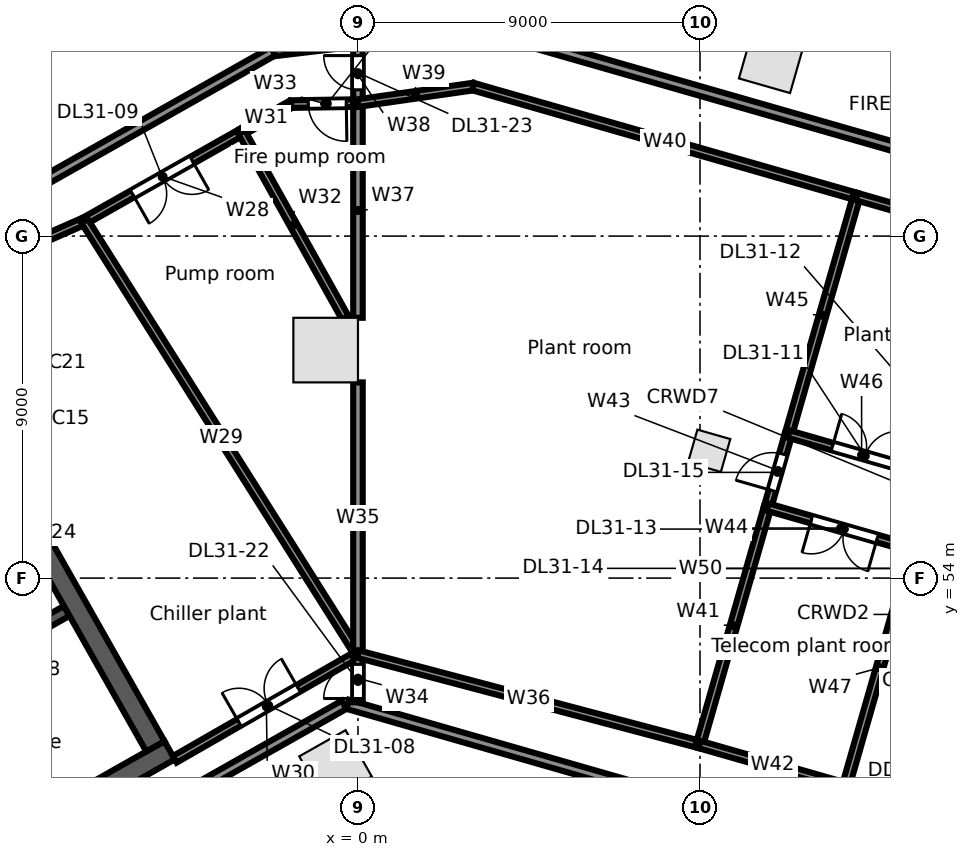
"""IFC4 building model, lengths in metres.
Left out: names, types, materials, properties, quantities, classifications, styles, units other than length and angle.
Written with IfcOpenShell. Run it as: python <this file> out.ifc"""

import sys

from ifc_helpers import new_model, si_unit, direction, frame, frame_2d, origin, origin_2d, place, context, subcontext, project, spatial, rectangle, extrude, element, fill, save


model = new_model("IFC4")
c1 = context("Model", 3, precision=1e-05, world=origin(), true_north=direction((0.0, 1.0)))
c2 = subcontext(c1, "Body", "Model", "MODEL_VIEW")
j1 = project(units=[si_unit("LENGTHUNIT", "METRE"), si_unit("PLANEANGLEUNIT", "RADIAN")], contexts=[c1])
p1 = place(None, origin())
s1 = spatial("IfcSite", under=j1, at=p1, CompositionType="ELEMENT")
p2 = place(p1, origin())
s2 = spatial("IfcBuilding", under=s1, at=p2, CompositionType="ELEMENT")
p3 = place(p2, frame((0.0, 0.0, 149.9)))
s3 = spatial("IfcBuildingStorey", under=s2, at=p3, CompositionType="ELEMENT", Elevation=149.9)
for number, where, z_axis, x_axis in (
    (1, (10.89, 67.629, 0.0), (0.0, 0.0, 1.0), (-0.961, 0.276, 0.0)),
    (2, (-0.591, 49.044, 0.0), (0.0, 0.0, 1.0), (0.87, 0.492, 0.0)),
):
    element("IfcColumn", number, at=place(p3, frame(where, z_axis=z_axis, x_axis=x_axis)), inside=s3, PredefinedType="COLUMN", context=c2, shape_type="SweptSolid", body=[
        extrude(rectangle(XDim=1.4, YDim=1.4, at=origin_2d()), origin(), (0.0, 0.0, 1.0), 5.0),
    ])
p4 = place(p3, frame((-0.85, 60.0, 0.0), z_axis=(0.0, 0.0, 1.0), x_axis=(0.0, 1.0, 0.0)))
e3 = element("IfcColumn", 3, at=p4, inside=s3, PredefinedType="COLUMN", context=c2, shape_type="SweptSolid", body=[
    extrude(rectangle(XDim=1.7, YDim=1.7, at=origin_2d()), origin(), (0.0, 0.0, 1.0), 5.0),
])
p5 = place(p3, frame((9.241, 57.35, 0.0), z_axis=(0.0, 0.0, 1.0), x_axis=(0.961261695938, -0.275637355817, 0.0)))
e4 = element("IfcColumn", 4, at=p5, inside=s3, PredefinedType="COLUMN", context=c2, shape_type="SweptSolid", body=[
    extrude(rectangle(XDim=0.9, YDim=0.9, at=origin_2d()), origin(), (0.0, 0.0, 1.0), 5.0),
])
p6 = place(p3, frame((3.135, 68.5, 0.0), z_axis=(0.0, 0.0, 1.0), x_axis=(0.961261620067, -0.275637620413, 0.0)))
e5 = element("IfcWall", 5, at=p6, inside=s3, PredefinedType="STANDARD", context=c2, shape_type="SweptSolid", body=[
    extrude(rectangle(XDim=31.907, YDim=0.25, at=frame_2d((15.953, 0.0))), origin(), (0.0, 0.0, 1.0), 3.768),
])
p7 = place(p3, frame((-2.278, 67.85, 0.0), z_axis=(0.0, 0.0, 1.0), x_axis=(0.993072509993, 0.117503148449, 0.0)))
e6 = element("IfcWall", 6, at=p7, inside=s3, PredefinedType="STANDARD", context=c2, shape_type="SweptSolid", body=[
    extrude(rectangle(XDim=5.5, YDim=0.25, at=frame_2d((2.75, 0.0))), origin(), (0.0, 0.0, 1.0), 3.768),
])
p8 = place(p3, frame((-56.251, 37.302, 0.0), z_axis=(0.0, 0.0, 1.0), x_axis=(0.87035543516, 0.49242402103, 0.0)))
e7 = element("IfcWall", 7, at=p8, inside=s3, PredefinedType="STANDARD", context=c2, shape_type="SweptSolid", body=[
    extrude(rectangle(XDim=62.067, YDim=0.25, at=frame_2d((31.033, 0.0))), origin(), (0.0, 0.0, 1.0), 3.872),
])
p9 = place(p3, frame((-0.364, 50.666, 0.0), z_axis=(0.0, 0.0, 1.0), x_axis=(-0.870355021882, -0.492424751494, 0.0)))
e8 = element("IfcWall", 8, at=p9, inside=s3, PredefinedType="STANDARD", context=c2, shape_type="SweptSolid", body=[
    extrude(rectangle(XDim=44.126, YDim=0.25, at=frame_2d((22.063, 0.0))), origin(), (0.0, 0.0, 1.0), 3.768),
])
p10 = place(p3, frame((26.726, 42.937, 0.0), z_axis=(0.0, 0.0, 1.0), x_axis=(-0.96126039977, 0.275641876052, 0.0)))
e9 = element("IfcWall", 9, at=p10, inside=s3, PredefinedType="STANDARD", context=c2, shape_type="SweptSolid", body=[
    extrude(rectangle(XDim=28.083, YDim=0.25, at=frame_2d((14.041, 0.0))), origin(), (0.0, 0.0, 1.0), 3.768),
])
p11 = place(p3, frame((-18.012, 42.083, 0.0), z_axis=(0.0, 0.0, 1.0), x_axis=(0.870360574057, 0.492414937962, 0.0)))
e10 = element("IfcWall", 10, at=p11, inside=s3, PredefinedType="SOLIDWALL", context=c2, shape_type="SweptSolid", body=[
    extrude(rectangle(XDim=15.0, YDim=0.55, at=frame_2d((7.5, 0.0))), origin(), (0.0, 0.0, 1.0), 4.68),
])
p12 = place(p11, frame((6.1, 0.0, 0.0)))
e11 = element("IfcOpeningElement", 11, at=p12, cuts=e10, PredefinedType="OPENING", context=c2, shape_type="SweptSolid", body=[
    extrude(rectangle(XDim=1.2, YDim=2.1, at=frame_2d((0.6, 1.05))), frame((0.0, 0.285, 0.0), z_axis=(0.0, -1.0, 0.0), x_axis=(1.0, 0.0, 0.0)), (0.0, 0.0, 1.0), 0.57),
])
p13 = place(p3, frame((-13.365, 49.911, 0.0), z_axis=(0.0, 0.0, 1.0), x_axis=(0.870336435567, 0.492457601144, 0.0)))
e12 = element("IfcWall", 12, at=p13, inside=s3, PredefinedType="SOLIDWALL", context=c2, shape_type="SweptSolid", body=[
    extrude(rectangle(XDim=6.55, YDim=0.3, at=frame_2d((3.275, 0.0))), origin(), (0.0, 0.0, 1.0), 4.68),
])
p14 = place(p13, frame((2.95, 0.0, 0.0)))
e13 = element("IfcOpeningElement", 13, at=p14, cuts=e12, PredefinedType="OPENING", context=c2, shape_type="SweptSolid", body=[
    extrude(rectangle(XDim=0.9, YDim=2.1, at=frame_2d((0.45, 1.05))), frame((0.0, 0.16, 0.0), z_axis=(0.0, -1.0, 0.0), x_axis=(1.0, 0.0, 0.0)), (0.0, 0.0, 1.0), 0.32),
])
p15 = place(p3, frame((-11.684, 60.8, 0.0), z_axis=(0.0, 0.0, 1.0), x_axis=(0.492427022044, -0.870353737259, 0.0)))
e14 = element("IfcWall", 14, at=p15, inside=s3, PredefinedType="SOLIDWALL", context=c2, shape_type="SweptSolid", body=[
    extrude(rectangle(XDim=12.9, YDim=0.55, at=frame_2d((6.45, 0.0))), origin(), (0.0, 0.0, 1.0), 4.68),
])
p16 = place(p3, frame((-11.715, 61.414, 0.0), z_axis=(0.0, 0.0, 1.0), x_axis=(0.915723068672, 0.401809981834, 0.0)))
e15 = element("IfcWall", 15, at=p16, inside=s3, PredefinedType="PARTITIONING", context=c2, shape_type="SweptSolid", body=[
    extrude(rectangle(XDim=4.935, YDim=0.2, at=frame_2d((2.468, 0.0))), origin(), (0.0, 0.0, 1.0), 3.852),
])
p17 = place(p3, frame((-7.196, 63.397, 0.0), z_axis=(0.0, 0.0, 1.0), x_axis=(0.870338743261, 0.492453522659, 0.0)))
e16 = element("IfcWall", 16, at=p17, inside=s3, PredefinedType="PARTITIONING", context=c2, shape_type="SweptSolid", body=[
    extrude(rectangle(XDim=4.75, YDim=0.2, at=frame_2d((2.375, 0.0))), origin(), (0.0, 0.0, 1.0), 4.68),
])
p18 = place(p17, frame((1.45, 0.0, 0.0)))
e17 = element("IfcOpeningElement", 17, at=p18, cuts=e16, PredefinedType="OPENING", context=c2, shape_type="SweptSolid", body=[
    extrude(rectangle(XDim=1.8, YDim=2.1, at=frame_2d((0.9, 1.05))), frame((0.0, 0.11, 0.0), z_axis=(0.0, -1.0, 0.0), x_axis=(1.0, 0.0, 0.0)), (0.0, 0.0, 1.0), 0.22),
])
p19 = place(p3, frame((-7.196, 63.397, 0.0), z_axis=(0.0, 0.0, 1.0), x_axis=(0.533884631006, -0.845557331454, 0.0)))
e18 = element("IfcWall", 18, at=p19, inside=s3, PredefinedType="PARTITIONING", context=c2, shape_type="SweptSolid", body=[
    extrude(rectangle(XDim=13.479, YDim=0.2, at=frame_2d((6.739, 0.0))), origin(), (0.0, 0.0, 1.0), 3.748),
])
p20 = place(p3, frame((-4.821, 49.23, 0.0), z_axis=(0.0, 0.0, 1.0), x_axis=(0.867068012741, 0.498189784401, 0.0)))
e19 = element("IfcWall", 19, at=p20, inside=s3, PredefinedType="PARTITIONING", context=c2, shape_type="SweptSolid", body=[
    extrude(rectangle(XDim=5.56, YDim=0.2, at=frame_2d((2.78, 0.0))), origin(), (0.0, 0.0, 1.0), 3.748),
])
p21 = place(p20, frame((1.95, 0.0, 0.0)))
e20 = element("IfcOpeningElement", 20, at=p21, cuts=e19, PredefinedType="OPENING", context=c2, shape_type="SweptSolid", body=[
    extrude(rectangle(XDim=1.8, YDim=2.1, at=frame_2d((0.9, 1.05))), frame((0.0, 0.11, 0.0), z_axis=(0.0, -1.0, 0.0), x_axis=(1.0, 0.0, 0.0)), (0.0, 0.0, 1.0), 0.22),
])
p22 = place(p3, frame((-3.062, 65.736, 0.0), z_axis=(0.0, 0.0, 1.0), x_axis=(0.870429354291, 0.492293346683, 0.0)))
e21 = element("IfcWall", 21, at=p22, inside=s3, PredefinedType="PARTITIONING", context=c2, shape_type="SweptSolid", body=[
    extrude(rectangle(XDim=1.499, YDim=0.2, at=frame_2d((0.75, 0.0))), origin(), (0.0, 0.0, 1.0), 4.68),
])
p23 = place(p3, frame((-3.062, 65.736, 0.0), z_axis=(0.0, 0.0, 1.0), x_axis=(0.487364611917, -0.873198565649, 0.0)))
e22 = element("IfcWall", 22, at=p23, inside=s3, PredefinedType="PARTITIONING", context=c2, shape_type="SweptSolid", body=[
    extrude(rectangle(XDim=5.595, YDim=0.2, at=frame_2d((2.798, 0.0))), origin(), (0.0, 0.0, 1.0), 3.96),
])
p24 = place(p3, frame((-1.757, 66.474, 0.0), z_axis=(0.0, 0.0, 1.0), x_axis=(0.999891555363, 0.014726761827, 0.0)))
e23 = element("IfcWall", 23, at=p24, inside=s3, PredefinedType="PARTITIONING", context=c2, shape_type="SweptSolid", body=[
    extrude(rectangle(XDim=1.757, YDim=0.2, at=frame_2d((0.879, 0.0))), origin(), (0.0, 0.0, 1.0), 3.96),
])
p25 = place(p24, frame((0.45, 0.0, 0.0)))
e24 = element("IfcOpeningElement", 24, at=p25, cuts=e23, PredefinedType="OPENING", context=c2, shape_type="SweptSolid", body=[
    extrude(rectangle(XDim=1.0, YDim=2.1, at=frame_2d((0.5, 1.05))), frame((0.0, 0.11, 0.0), z_axis=(0.0, -1.0, 0.0), x_axis=(1.0, 0.0, 0.0)), (0.0, 0.0, 1.0), 0.22),
])
p26 = place(p3, frame((0.0, 50.731, 0.0), z_axis=(0.0, 0.0, 1.0), x_axis=(0.0, 1.0, 0.0)))
e25 = element("IfcWall", 25, at=p26, inside=s3, PredefinedType="PARTITIONING", context=c2, shape_type="SweptSolid", body=[
    extrude(rectangle(XDim=1.269, YDim=0.25, at=frame_2d((0.635, 0.0))), origin(), (0.0, 0.0, 1.0), 4.68),
])
p27 = place(p26, frame((0.1, 0.0, 0.0)))
e26 = element("IfcOpeningElement", 26, at=p27, cuts=e25, PredefinedType="OPENING", context=c2, shape_type="SweptSolid", body=[
    extrude(rectangle(XDim=0.9, YDim=2.1, at=frame_2d((0.45, 1.05))), frame((0.0, 0.135, 0.0), z_axis=(0.0, -1.0, 0.0), x_axis=(1.0, 0.0, 0.0)), (0.0, 0.0, 1.0), 0.27),
])
p28 = place(p3, frame((0.0, 52.0, 0.0), z_axis=(0.0, 0.0, 1.0), x_axis=(0.0, 1.0, 0.0)))
e27 = element("IfcWall", 27, at=p28, inside=s3, PredefinedType="PARTITIONING", context=c2, shape_type="SweptSolid", body=[
    extrude(rectangle(XDim=7.15, YDim=0.25, at=frame_2d((3.575, 0.0))), origin(), (0.0, 0.0, 1.0), 4.68),
])
p29 = place(p3, frame((0.0, 52.0, 0.0), z_axis=(0.0, 0.0, 1.0), x_axis=(0.966705801065, -0.255890394871, 0.0)))
e28 = element("IfcWall", 28, at=p29, inside=s3, PredefinedType="PARTITIONING", context=c2, shape_type="SweptSolid", body=[
    extrude(rectangle(XDim=9.297, YDim=0.2, at=frame_2d((4.648, 0.0))), origin(), (0.0, 0.0, 1.0), 3.86),
])
p30 = place(p3, frame((0.0, 60.85, 0.0), z_axis=(0.0, 0.0, 1.0), x_axis=(0.0, 1.0, 0.0)))
e29 = element("IfcWall", 29, at=p30, inside=s3, PredefinedType="PARTITIONING", context=c2, shape_type="SweptSolid", body=[
    extrude(rectangle(XDim=5.65, YDim=0.25, at=frame_2d((2.825, 0.0))), origin(), (0.0, 0.0, 1.0), 3.96),
])
p31 = place(p3, frame((0.0, 66.5, 0.0), z_axis=(0.0, 0.0, 1.0), x_axis=(0.0, 1.0, 0.0)))
e30 = element("IfcWall", 30, at=p31, inside=s3, PredefinedType="PARTITIONING", context=c2, shape_type="SweptSolid", body=[
    extrude(rectangle(XDim=1.494, YDim=0.25, at=frame_2d((0.747, 0.0))), origin(), (0.0, 0.0, 1.0), 3.96),
])
p32 = place(p31, frame((0.35, 0.0, 0.0)))
e31 = element("IfcOpeningElement", 31, at=p32, cuts=e30, PredefinedType="OPENING", context=c2, shape_type="SweptSolid", body=[
    extrude(rectangle(XDim=0.9, YDim=2.1, at=frame_2d((0.45, 1.05))), frame((0.0, 0.135, 0.0), z_axis=(0.0, -1.0, 0.0), x_axis=(1.0, 0.0, 0.0)), (0.0, 0.0, 1.0), 0.27),
])
p33 = place(p3, frame((0.0, 66.5, 0.0), z_axis=(0.0, 0.0, 1.0), x_axis=(0.989887165849, 0.1418569663, 0.0)))
e32 = element("IfcWall", 32, at=p33, inside=s3, PredefinedType="PARTITIONING", context=c2, shape_type="SweptSolid", body=[
    extrude(rectangle(XDim=3.06, YDim=0.2, at=frame_2d((1.53, 0.0))), origin(), (0.0, 0.0, 1.0), 3.748),
])
p34 = place(p3, frame((3.029, 66.934, 0.0), z_axis=(0.0, 0.0, 1.0), x_axis=(0.961263796718, -0.275630029421, 0.0)))
e33 = element("IfcWall", 33, at=p34, inside=s3, PredefinedType="PARTITIONING", context=c2, shape_type="SweptSolid", body=[
    extrude(rectangle(XDim=10.5, YDim=0.2, at=frame_2d((5.25, 0.0))), origin(), (0.0, 0.0, 1.0), 3.748),
])
p35 = place(p3, frame((8.987, 49.621, 0.0), z_axis=(0.0, 0.0, 1.0), x_axis=(0.275703259795, 0.961242795832, 0.0)))
e34 = element("IfcWall", 34, at=p35, inside=s3, PredefinedType="PARTITIONING", context=c2, shape_type="SweptSolid", body=[
    extrude(rectangle(XDim=6.5, YDim=0.2, at=frame_2d((3.25, 0.0))), origin(), (0.0, 0.0, 1.0), 3.86),
])
p36 = place(p3, frame((8.987, 49.621, 0.0), z_axis=(0.0, 0.0, 1.0), x_axis=(0.961228587008, -0.275752794216, 0.0)))
e35 = element("IfcWall", 35, at=p36, inside=s3, PredefinedType="PARTITIONING", context=c2, shape_type="SweptSolid", body=[
    extrude(rectangle(XDim=4.0, YDim=0.2, at=frame_2d((2.0, 0.0))), origin(), (0.0, 0.0, 1.0), 3.748),
])
p37 = place(p3, frame((10.779, 55.869, 0.0), z_axis=(0.0, 0.0, 1.0), x_axis=(0.275575706981, 0.961279371318, 0.0)))
e36 = element("IfcWall", 36, at=p37, inside=s3, PredefinedType="PARTITIONING", context=c2, shape_type="SweptSolid", body=[
    extrude(rectangle(XDim=2.0, YDim=0.2, at=frame_2d((1.0, 0.0))), origin(), (0.0, 0.0, 1.0), 3.748),
])
p38 = place(p37, frame((0.45, 0.0, 0.0)))
e37 = element("IfcOpeningElement", 37, at=p38, cuts=e36, PredefinedType="OPENING", context=c2, shape_type="SweptSolid", body=[
    extrude(rectangle(XDim=1.0, YDim=2.1, at=frame_2d((0.5, 1.05))), frame((0.0, 0.11, 0.0), z_axis=(0.0, -1.0, 0.0), x_axis=(1.0, 0.0, 0.0)), (0.0, 0.0, 1.0), 0.22),
])
p39 = place(p3, frame((10.779, 55.869, 0.0), z_axis=(0.0, 0.0, 1.0), x_axis=(0.961244763457, -0.275696399552, 0.0)))
e38 = element("IfcWall", 38, at=p39, inside=s3, PredefinedType="PARTITIONING", context=c2, shape_type="SweptSolid", body=[
    extrude(rectangle(XDim=4.0, YDim=0.2, at=frame_2d((2.0, 0.0))), origin(), (0.0, 0.0, 1.0), 3.748),
])
p40 = place(p39, frame((1.2, 0.0, 0.0)))
e39 = element("IfcOpeningElement", 39, at=p40, cuts=e38, PredefinedType="OPENING", context=c2, shape_type="SweptSolid", body=[
    extrude(rectangle(XDim=1.8, YDim=2.1, at=frame_2d((0.9, 1.05))), frame((0.0, 0.11, 0.0), z_axis=(0.0, -1.0, 0.0), x_axis=(1.0, 0.0, 0.0)), (0.0, 0.0, 1.0), 0.22),
])
p41 = place(p3, frame((11.33, 57.791, 0.0), z_axis=(0.0, 0.0, 1.0), x_axis=(0.27565349575, 0.96125706774, 0.0)))
e40 = element("IfcWall", 40, at=p41, inside=s3, PredefinedType="PARTITIONING", context=c2, shape_type="SweptSolid", body=[
    extrude(rectangle(XDim=6.501, YDim=0.2, at=frame_2d((3.25, 0.0))), origin(), (0.0, 0.0, 1.0), 3.748),
])
p42 = place(p3, frame((11.33, 57.791, 0.0), z_axis=(0.0, 0.0, 1.0), x_axis=(0.961293276216, -0.275527198479, 0.0)))
e41 = element("IfcWall", 41, at=p42, inside=s3, PredefinedType="PARTITIONING", context=c2, shape_type="SweptSolid", body=[
    extrude(rectangle(XDim=4.0, YDim=0.2, at=frame_2d((2.0, 0.0))), origin(), (0.0, 0.0, 1.0), 4.68),
])
p43 = place(p42, frame((1.2, 0.0, 0.0)))
e42 = element("IfcOpeningElement", 42, at=p43, cuts=e41, PredefinedType="OPENING", context=c2, shape_type="SweptSolid", body=[
    extrude(rectangle(XDim=1.8, YDim=2.1, at=frame_2d((0.9, 1.05))), frame((0.0, 0.11, 0.0), z_axis=(0.0, -1.0, 0.0), x_axis=(1.0, 0.0, 0.0)), (0.0, 0.0, 1.0), 0.22),
])
p44 = place(p3, frame((12.832, 48.518, 0.0), z_axis=(0.0, 0.0, 1.0), x_axis=(0.275693305607, 0.961245650832, 0.0)))
e43 = element("IfcWall", 43, at=p44, inside=s3, PredefinedType="PARTITIONING", context=c2, shape_type="SweptSolid", body=[
    extrude(rectangle(XDim=6.5, YDim=0.2, at=frame_2d((3.25, 0.0))), origin(), (0.0, 0.0, 1.0), 4.68),
])
p45 = place(p3, frame((13.122, 64.04, 0.0), z_axis=(0.0, 0.0, 1.0), x_axis=(0.961228587008, -0.275752794216, 0.0)))
e44 = element("IfcWall", 44, at=p45, inside=s3, PredefinedType="PARTITIONING", context=c2, shape_type="SweptSolid", body=[
    extrude(rectangle(XDim=4.0, YDim=0.2, at=frame_2d((2.0, 0.0))), origin(), (0.0, 0.0, 1.0), 3.748),
])
p46 = place(p21, origin())
e45 = element("IfcDoor", 45, at=p46, inside=s3, OperationType="DOUBLE_DOOR_SINGLE_SWING", PredefinedType="DOOR", context=c2, shape_type="SweptSolid", body=[
    extrude(rectangle(XDim=1.8, YDim=2.1, at=frame_2d((0.9, 1.05))), frame((0.0, 0.025, 0.0), z_axis=(0.0, -1.0, 0.0), x_axis=(1.0, 0.0, 0.0)), (0.0, 0.0, 1.0), 0.05),
])
fill(e20, e45)
p47 = place(p18, frame((1.8, 0.0, 0.0), z_axis=(0.0, 0.0, 1.0), x_axis=(-1.0, 0.0, 0.0)))
e46 = element("IfcDoor", 46, at=p47, inside=s3, OperationType="DOUBLE_DOOR_SINGLE_SWING", PredefinedType="DOOR", context=c2, shape_type="SweptSolid", body=[
    extrude(rectangle(XDim=1.8, YDim=2.1, at=frame_2d((0.9, 1.05))), frame((0.0, 0.025, 0.0), z_axis=(0.0, -1.0, 0.0), x_axis=(1.0, 0.0, 0.0)), (0.0, 0.0, 1.0), 0.05),
])
fill(e17, e46)
p48 = place(p25, frame((1.0, 0.0, 0.0), z_axis=(0.0, 0.0, 1.0), x_axis=(-1.0, 0.0, 0.0)))
e47 = element("IfcDoor", 47, at=p48, inside=s3, OperationType="SINGLE_SWING_LEFT", PredefinedType="DOOR", context=c2, shape_type="SweptSolid", body=[
    extrude(rectangle(XDim=1.0, YDim=2.1, at=frame_2d((0.5, 1.05))), frame((0.0, 0.025, 0.0), z_axis=(0.0, -1.0, 0.0), x_axis=(1.0, 0.0, 0.0)), (0.0, 0.0, 1.0), 0.05),
])
fill(e24, e47)
p49 = place(p43, origin())
e48 = element("IfcDoor", 48, at=p49, inside=s3, OperationType="DOUBLE_DOOR_SINGLE_SWING", PredefinedType="DOOR", context=c2, shape_type="SweptSolid", body=[
    extrude(rectangle(XDim=1.8, YDim=2.1, at=frame_2d((0.9, 1.05))), frame((0.0, 0.025, 0.0), z_axis=(0.0, -1.0, 0.0), x_axis=(1.0, 0.0, 0.0)), (0.0, 0.0, 1.0), 0.05),
])
fill(e42, e48)
p50 = place(p40, frame((1.8, 0.0, 0.0), z_axis=(0.0, 0.0, 1.0), x_axis=(-1.0, 0.0, 0.0)))
e49 = element("IfcDoor", 49, at=p50, inside=s3, OperationType="DOUBLE_DOOR_SINGLE_SWING", PredefinedType="DOOR", context=c2, shape_type="SweptSolid", body=[
    extrude(rectangle(XDim=1.8, YDim=2.1, at=frame_2d((0.9, 1.05))), frame((0.0, 0.025, 0.0), z_axis=(0.0, -1.0, 0.0), x_axis=(1.0, 0.0, 0.0)), (0.0, 0.0, 1.0), 0.05),
])
fill(e39, e49)
p51 = place(p38, origin())
e50 = element("IfcDoor", 50, at=p51, inside=s3, OperationType="SINGLE_SWING_LEFT", PredefinedType="DOOR", context=c2, shape_type="SweptSolid", body=[
    extrude(rectangle(XDim=1.0, YDim=2.1, at=frame_2d((0.5, 1.05))), frame((0.0, 0.025, 0.0), z_axis=(0.0, -1.0, 0.0), x_axis=(1.0, 0.0, 0.0)), (0.0, 0.0, 1.0), 0.05),
])
fill(e37, e50)
p52 = place(p27, origin())
e51 = element("IfcDoor", 51, at=p52, inside=s3, OperationType="SINGLE_SWING_LEFT", PredefinedType="DOOR", context=c2, shape_type="SweptSolid", body=[
    extrude(rectangle(XDim=0.9, YDim=2.1, at=frame_2d((0.45, 1.05))), frame((0.0, 0.025, 0.0), z_axis=(0.0, -1.0, 0.0), x_axis=(1.0, 0.0, 0.0)), (0.0, 0.0, 1.0), 0.05),
])
fill(e26, e51)
p53 = place(p32, origin())
e52 = element("IfcDoor", 52, at=p53, inside=s3, OperationType="SINGLE_SWING_RIGHT", PredefinedType="DOOR", context=c2, shape_type="SweptSolid", body=[
    extrude(rectangle(XDim=0.9, YDim=2.1, at=frame_2d((0.45, 1.05))), frame((0.0, 0.025, 0.0), z_axis=(0.0, -1.0, 0.0), x_axis=(1.0, 0.0, 0.0)), (0.0, 0.0, 1.0), 0.05),
])
fill(e31, e52)
save(model, sys.argv[1])
